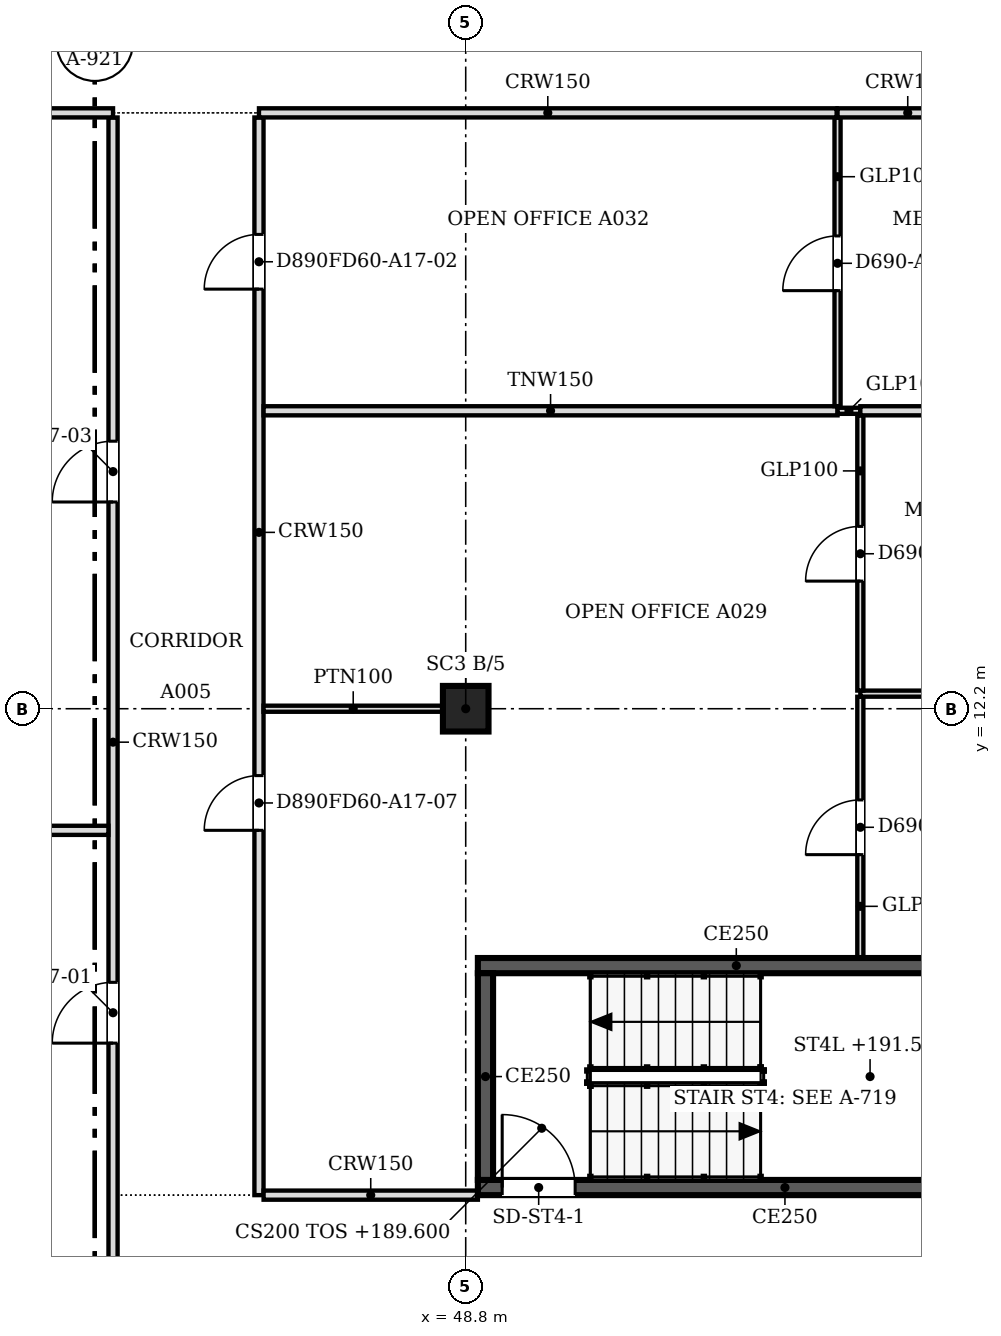
"""IFC4 building model, lengths in metres.
Left out: names, types, materials, properties, quantities, classifications, styles, units other than length and angle.
Written with IfcOpenShell. Run it as: python <this file> out.ifc"""

import sys

from ifc_helpers import new_model, si_unit, direction, frame, frame_2d, origin, origin_2d, place, context, subcontext, project, spatial, rectangle, extrude, source, transform, mapped, element, fill, save


model = new_model("IFC4")
c1 = context("Model", 3, precision=1e-05, world=origin(), true_north=direction((0.0, 1.0)))
c2 = subcontext(c1, "Body", "Model", "MODEL_VIEW")
j1 = project(units=[si_unit("LENGTHUNIT", "METRE"), si_unit("PLANEANGLEUNIT", "RADIAN")], contexts=[c1])
p1 = place(None, origin())
s1 = spatial("IfcSite", under=j1, at=p1, CompositionType="ELEMENT")
p2 = place(p1, origin())
s2 = spatial("IfcBuilding", under=s1, at=p2, CompositionType="ELEMENT")
p3 = place(p2, frame((0.0, 0.0, 189.6)))
s3 = spatial("IfcBuildingStorey", under=s2, at=p3, CompositionType="ELEMENT", Elevation=189.6)
p4 = place(p3, frame((48.8, 12.2, 0.0), z_axis=(0.0, 0.0, 1.0), x_axis=(1.0, 0.0, 0.0)))
e1 = element("IfcColumn", 1, at=p4, inside=s3, PredefinedType="COLUMN", context=c2, shape_type="SweptSolid", body=[
    extrude(rectangle(XDim=0.75, YDim=0.75, at=origin_2d()), origin(), (0.0, 0.0, 1.0), 3.55),
])
p5 = place(p3, frame((57.5, 4.325, 0.0), z_axis=(0.0, 0.0, 1.0), x_axis=(-1.0, 0.0, 0.0)))
e2 = element("IfcWall", 2, at=p5, inside=s3, PredefinedType="SOLIDWALL", context=c2, shape_type="SweptSolid", body=[
    extrude(rectangle(XDim=8.5, YDim=0.25, at=frame_2d((4.25, 0.0))), origin(), (0.0, 0.0, 1.0), 3.8),
])
m1 = source(origin(), c2, "Body", "SweptSolid", [
    extrude(rectangle(XDim=1.2, YDim=2.1, at=frame_2d((0.6, 1.05))), frame((0.0, 0.135, 0.0), z_axis=(0.0, -1.0, 0.0), x_axis=(1.0, 0.0, 0.0)), (0.0, 0.0, 1.0), 0.27),
])
p6 = place(p5, frame((6.9, 0.0, 0.0)))
e3 = element("IfcOpeningElement", 3, at=p6, cuts=e2, PredefinedType="OPENING", context=c2, shape_type="MappedRepresentation", body=[
    mapped(m1, transform((0.0, 0.0, 0.0), scale=1.0)),
])
p7 = place(p3, frame((49.125, 4.45, 0.0), z_axis=(0.0, 0.0, 1.0), x_axis=(0.0, 1.0, 0.0)))
e4 = element("IfcWall", 4, at=p7, inside=s3, PredefinedType="SOLIDWALL", context=c2, shape_type="SweptSolid", body=[
    extrude(rectangle(XDim=3.4, YDim=0.25, at=frame_2d((1.7, 0.0))), origin(), (0.0, 0.0, 1.0), 3.8),
])
p8 = place(p3, frame((49.0, 7.975, 0.0), z_axis=(0.0, 0.0, 1.0), x_axis=(1.0, 0.0, 0.0)))
e5 = element("IfcWall", 5, at=p8, inside=s3, PredefinedType="SOLIDWALL", context=c2, shape_type="SweptSolid", body=[
    extrude(rectangle(XDim=8.5, YDim=0.25, at=frame_2d((4.25, 0.0))), origin(), (0.0, 0.0, 1.0), 3.8),
])
p9 = place(p3, frame((43.0, 0.5, 0.0), z_axis=(0.0, 0.0, 1.0), x_axis=(0.0, 1.0, 0.0)))
e6 = element("IfcWall", 6, at=p9, inside=s3, PredefinedType="PARTITIONING", context=c2, shape_type="SweptSolid", body=[
    extrude(rectangle(XDim=21.424, YDim=0.15, at=frame_2d((10.712, 0.0))), origin(), (0.0, 0.0, 1.0), 2.947),
])
m2 = source(origin(), c2, "Body", "SweptSolid", [
    extrude(rectangle(XDim=1.0, YDim=2.1, at=frame_2d((0.5, 1.05))), frame((0.0, 0.085, 0.0), z_axis=(0.0, -1.0, 0.0), x_axis=(1.0, 0.0, 0.0)), (0.0, 0.0, 1.0), 0.17),
])
p10 = place(p9, frame((6.2, 0.0, 0.0)))
e7 = element("IfcOpeningElement", 7, at=p10, cuts=e6, PredefinedType="OPENING", context=c2, shape_type="MappedRepresentation", body=[
    mapped(m2, transform((0.0, 0.0, 0.0), scale=1.0)),
])
p11 = place(p9, frame((15.1, 0.0, 0.0)))
e8 = element("IfcOpeningElement", 8, at=p11, cuts=e6, PredefinedType="OPENING", context=c2, shape_type="MappedRepresentation", body=[
    mapped(m2, transform((0.0, 0.0, 0.0), scale=1.0)),
])
p12 = place(p3, frame((45.4, 21.924, 0.0), z_axis=(0.0, 0.0, 1.0), x_axis=(0.0, -1.0, 0.0)))
e9 = element("IfcWall", 9, at=p12, inside=s3, PredefinedType="PARTITIONING", context=c2, shape_type="SweptSolid", body=[
    extrude(rectangle(XDim=17.724, YDim=0.15, at=frame_2d((8.862, 0.0))), origin(), (0.0, 0.0, 1.0), 2.947),
])
m3 = source(origin(), c2, "Body", "SweptSolid", [
    extrude(rectangle(XDim=0.9, YDim=2.1, at=frame_2d((0.45, 1.05))), frame((0.0, 0.085, 0.0), z_axis=(0.0, -1.0, 0.0), x_axis=(1.0, 0.0, 0.0)), (0.0, 0.0, 1.0), 0.17),
])
p13 = place(p12, frame((1.923, 0.0, 0.0)))
e10 = element("IfcOpeningElement", 10, at=p13, cuts=e9, PredefinedType="OPENING", context=c2, shape_type="MappedRepresentation", body=[
    mapped(m3, transform((0.0, 0.0, 0.0), scale=1.0)),
])
p14 = place(p12, frame((10.824, 0.0, 0.0)))
e11 = element("IfcOpeningElement", 11, at=p14, cuts=e9, PredefinedType="OPENING", context=c2, shape_type="MappedRepresentation", body=[
    mapped(m3, transform((0.0, 0.0, 0.0), scale=1.0)),
])
p15 = place(p3, frame((45.476, 4.2, 0.0), z_axis=(0.0, 0.0, 1.0), x_axis=(1.0, 0.0, 0.0)))
e12 = element("IfcWall", 12, at=p15, inside=s3, PredefinedType="PARTITIONING", context=c2, shape_type="SweptSolid", body=[
    extrude(rectangle(XDim=3.524, YDim=0.15, at=frame_2d((1.762, 0.0))), origin(), (0.0, 0.0, 1.0), 2.947),
])
p16 = place(p3, frame((55.29, 12.397, 0.0), z_axis=(0.0, 0.0, 1.0), x_axis=(0.0, -1.0, 0.0)))
e13 = element("IfcWall", 13, at=p16, inside=s3, PredefinedType="PARTITIONING", context=c2, shape_type="SweptSolid", body=[
    extrude(rectangle(XDim=4.297, YDim=0.1, at=frame_2d((2.148, 0.0))), origin(), (0.0, 0.0, 1.0), 2.947),
])
m4 = source(origin(), c2, "Body", "SweptSolid", [
    extrude(rectangle(XDim=0.9, YDim=2.1, at=frame_2d((0.45, 1.05))), frame((0.0, 0.06, 0.0), z_axis=(0.0, -1.0, 0.0), x_axis=(1.0, 0.0, 0.0)), (0.0, 0.0, 1.0), 0.12),
])
p17 = place(p16, frame((1.697, 0.0, 0.0)))
e14 = element("IfcOpeningElement", 14, at=p17, cuts=e13, PredefinedType="OPENING", context=c2, shape_type="MappedRepresentation", body=[
    mapped(m4, transform((0.0, 0.0, 0.0), scale=1.0)),
])
p18 = place(p3, frame((24.9, 10.2, 0.0), z_axis=(0.0, 0.0, 1.0), x_axis=(1.0, 0.0, 0.0)))
e15 = element("IfcWall", 15, at=p18, inside=s3, PredefinedType="PARTITIONING", context=c2, shape_type="SweptSolid", body=[
    extrude(rectangle(XDim=18.024, YDim=0.15, at=frame_2d((9.012, 0.0))), origin(), (0.0, 0.0, 1.0), 2.947),
])
p19 = place(p3, frame((48.425, 12.2, 0.0), z_axis=(0.0, 0.0, 1.0), x_axis=(-1.0, 0.0, 0.0)))
e16 = element("IfcWall", 16, at=p19, inside=s3, PredefinedType="PARTITIONING", context=c2, shape_type="SweptSolid", body=[
    extrude(rectangle(XDim=2.95, YDim=0.1, at=frame_2d((1.475, 0.0))), origin(), (0.0, 0.0, 1.0), 2.947),
])
p20 = place(p3, frame((55.29, 12.448, 0.0), z_axis=(0.0, 0.0, 1.0), x_axis=(1.0, 0.0, 0.0)))
e17 = element("IfcWall", 17, at=p20, inside=s3, PredefinedType="PARTITIONING", context=c2, shape_type="SweptSolid", body=[
    extrude(rectangle(XDim=5.21, YDim=0.1, at=frame_2d((2.605, 0.0))), origin(), (0.0, 0.0, 1.0), 2.947),
])
p21 = place(p3, frame((55.29, 17.024, 0.0), z_axis=(0.0, 0.0, 1.0), x_axis=(0.0, -1.0, 0.0)))
e18 = element("IfcWall", 18, at=p21, inside=s3, PredefinedType="PARTITIONING", context=c2, shape_type="SweptSolid", body=[
    extrude(rectangle(XDim=4.525, YDim=0.1, at=frame_2d((2.263, 0.0))), origin(), (0.0, 0.0, 1.0), 2.947),
])
p22 = place(p21, frame((1.825, 0.0, 0.0)))
e19 = element("IfcOpeningElement", 19, at=p22, cuts=e18, PredefinedType="OPENING", context=c2, shape_type="MappedRepresentation", body=[
    mapped(m4, transform((0.0, 0.0, 0.0), scale=1.0)),
])
p23 = place(p3, frame((45.476, 17.1, 0.0), z_axis=(0.0, 0.0, 1.0), x_axis=(1.0, 0.0, 0.0)))
e20 = element("IfcWall", 20, at=p23, inside=s3, PredefinedType="PARTITIONING", context=c2, shape_type="SweptSolid", body=[
    extrude(rectangle(XDim=9.439, YDim=0.15, at=frame_2d((4.719, 0.0))), origin(), (0.0, 0.0, 1.0), 2.947),
])
p24 = place(p3, frame((54.916, 17.1, 0.0), z_axis=(0.0, 0.0, 1.0), x_axis=(1.0, 0.0, 0.0)))
e21 = element("IfcWall", 21, at=p24, inside=s3, PredefinedType="PARTITIONING", context=c2, shape_type="SweptSolid", body=[
    extrude(rectangle(XDim=0.373, YDim=0.1, at=frame_2d((0.187, 0.0))), origin(), (0.0, 0.0, 1.0), 2.947),
])
p25 = place(p3, frame((55.29, 17.1, 0.0), z_axis=(0.0, 0.0, 1.0), x_axis=(1.0, 0.0, 0.0)))
e22 = element("IfcWall", 22, at=p25, inside=s3, PredefinedType="PARTITIONING", context=c2, shape_type="SweptSolid", body=[
    extrude(rectangle(XDim=5.21, YDim=0.15, at=frame_2d((2.605, 0.0))), origin(), (0.0, 0.0, 1.0), 2.947),
])
p26 = place(p3, frame((54.915, 21.924, 0.0), z_axis=(0.0, 0.0, 1.0), x_axis=(0.0, -1.0, 0.0)))
e23 = element("IfcWall", 23, at=p26, inside=s3, PredefinedType="PARTITIONING", context=c2, shape_type="SweptSolid", body=[
    extrude(rectangle(XDim=4.748, YDim=0.1, at=frame_2d((2.374, 0.0))), origin(), (0.0, 0.0, 1.0), 2.947),
])
p27 = place(p26, frame((1.948, 0.0, 0.0)))
e24 = element("IfcOpeningElement", 24, at=p27, cuts=e23, PredefinedType="OPENING", context=c2, shape_type="MappedRepresentation", body=[
    mapped(m4, transform((0.0, 0.0, 0.0), scale=1.0)),
])
p28 = place(p3, frame((30.5, 22.0, 0.0), z_axis=(0.0, 0.0, 1.0), x_axis=(1.0, 0.0, 0.0)))
e25 = element("IfcWall", 25, at=p28, inside=s3, PredefinedType="PARTITIONING", context=c2, shape_type="SweptSolid", body=[
    extrude(rectangle(XDim=12.5, YDim=0.15, at=frame_2d((6.25, 0.0))), origin(), (0.0, 0.0, 1.0), 2.947),
])
p29 = place(p3, frame((45.4, 22.0, 0.0), z_axis=(0.0, 0.0, 1.0), x_axis=(1.0, 0.0, 0.0)))
e26 = element("IfcWall", 26, at=p29, inside=s3, PredefinedType="PARTITIONING", context=c2, shape_type="SweptSolid", body=[
    extrude(rectangle(XDim=9.5, YDim=0.15, at=frame_2d((4.75, 0.0))), origin(), (0.0, 0.0, 1.0), 2.947),
])
p30 = place(p3, frame((54.915, 22.0, 0.0), z_axis=(0.0, 0.0, 1.0), x_axis=(1.0, 0.0, 0.0)))
e27 = element("IfcWall", 27, at=p30, inside=s3, PredefinedType="PARTITIONING", context=c2, shape_type="SweptSolid", body=[
    extrude(rectangle(XDim=2.309, YDim=0.15, at=frame_2d((1.155, 0.0))), origin(), (0.0, 0.0, 1.0), 2.947),
])
m5 = source(origin(), c2, "Body", "SweptSolid", [
    extrude(rectangle(XDim=1.2, YDim=2.1, at=frame_2d((0.6, 1.05))), frame((0.0, 0.025, 0.0), z_axis=(0.0, -1.0, 0.0), x_axis=(1.0, 0.0, 0.0)), (0.0, 0.0, 1.0), 0.05),
])
p31 = place(p6, origin())
e28 = element("IfcDoor", 28, at=p31, inside=s3, OperationType="SINGLE_SWING_RIGHT", PredefinedType="DOOR", context=c2, shape_type="MappedRepresentation", body=[
    mapped(m5, transform((0.0, 0.0, 0.0), scale=1.0)),
])
fill(e3, e28)
m6 = source(origin(), c2, "Body", "SweptSolid", [
    extrude(rectangle(XDim=0.9, YDim=2.1, at=frame_2d((0.45, 1.05))), frame((0.0, 0.025, 0.0), z_axis=(0.0, -1.0, 0.0), x_axis=(1.0, 0.0, 0.0)), (0.0, 0.0, 1.0), 0.05),
])
p32 = place(p17, origin())
e29 = element("IfcDoor", 29, at=p32, inside=s3, OperationType="SINGLE_SWING_RIGHT", PredefinedType="DOOR", context=c2, shape_type="MappedRepresentation", body=[
    mapped(m6, transform((0.0, 0.0, 0.0), scale=1.0)),
])
fill(e14, e29)
p33 = place(p22, origin())
e30 = element("IfcDoor", 30, at=p33, inside=s3, OperationType="SINGLE_SWING_RIGHT", PredefinedType="DOOR", context=c2, shape_type="MappedRepresentation", body=[
    mapped(m6, transform((0.0, 0.0, 0.0), scale=1.0)),
])
fill(e19, e30)
p34 = place(p27, origin())
e31 = element("IfcDoor", 31, at=p34, inside=s3, OperationType="SINGLE_SWING_RIGHT", PredefinedType="DOOR", context=c2, shape_type="MappedRepresentation", body=[
    mapped(m6, transform((0.0, 0.0, 0.0), scale=1.0)),
])
fill(e24, e31)
p35 = place(p13, origin())
e32 = element("IfcDoor", 32, at=p35, inside=s3, OperationType="SINGLE_SWING_RIGHT", PredefinedType="DOOR", context=c2, shape_type="MappedRepresentation", body=[
    mapped(m6, transform((0.0, 0.0, 0.0), scale=1.0)),
])
fill(e10, e32)
m7 = source(origin(), c2, "Body", "SweptSolid", [
    extrude(rectangle(XDim=1.0, YDim=2.1, at=frame_2d((0.5, 1.05))), frame((0.0, 0.025, 0.0), z_axis=(0.0, -1.0, 0.0), x_axis=(1.0, 0.0, 0.0)), (0.0, 0.0, 1.0), 0.05),
])
p36 = place(p10, origin())
e33 = element("IfcDoor", 33, at=p36, inside=s3, OperationType="SINGLE_SWING_LEFT", PredefinedType="DOOR", context=c2, shape_type="MappedRepresentation", body=[
    mapped(m7, transform((0.0, 0.0, 0.0), scale=1.0)),
])
fill(e7, e33)
p37 = place(p11, origin())
e34 = element("IfcDoor", 34, at=p37, inside=s3, OperationType="SINGLE_SWING_LEFT", PredefinedType="DOOR", context=c2, shape_type="MappedRepresentation", body=[
    mapped(m7, transform((0.0, 0.0, 0.0), scale=1.0)),
])
fill(e8, e34)
p38 = place(p14, origin())
e35 = element("IfcDoor", 35, at=p38, inside=s3, OperationType="SINGLE_SWING_RIGHT", PredefinedType="DOOR", context=c2, shape_type="MappedRepresentation", body=[
    mapped(m6, transform((0.0, 0.0, 0.0), scale=1.0)),
])
fill(e11, e35)
save(model, sys.argv[1])
